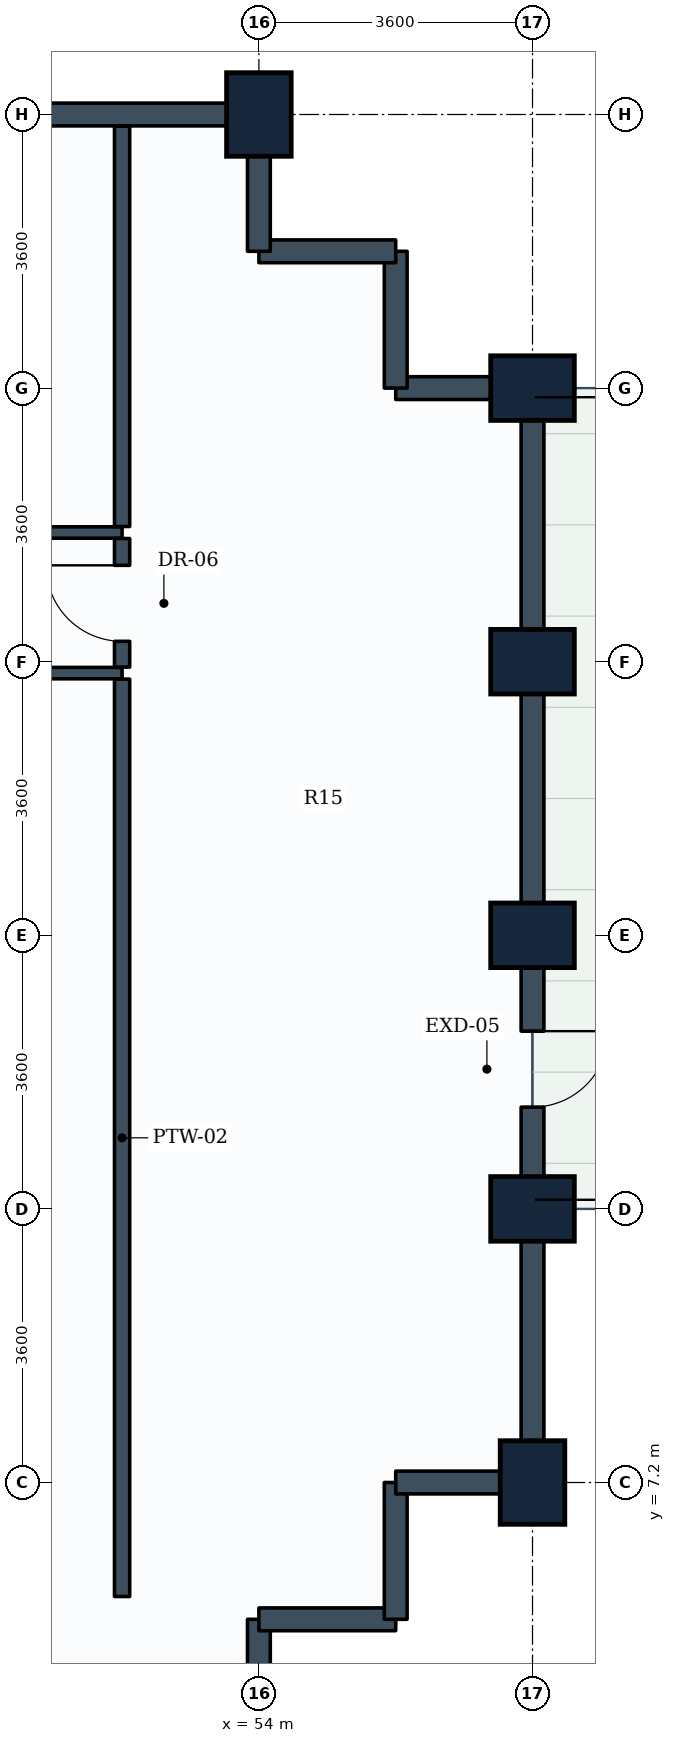
"""IFC4 building model, lengths in metres.
Left out: names, types, materials, properties, quantities, classifications, styles, units other than length and angle.
Written with IfcOpenShell. Run it as: python <this file> out.ifc"""

import sys

from ifc_helpers import new_model, si_unit, direction, frame, frame_2d, origin, origin_2d, place, context, subcontext, project, spatial, rectangle, extrude, element, fill, save


model = new_model("IFC4")
c1 = context("Model", 3, precision=1e-05, world=origin(), true_north=direction((0.0, 1.0)))
c2 = subcontext(c1, "Body", "Model", "MODEL_VIEW")
j1 = project(units=[si_unit("LENGTHUNIT", "METRE"), si_unit("PLANEANGLEUNIT", "RADIAN")], contexts=[c1])
p1 = place(None, origin())
s1 = spatial("IfcSite", under=j1, at=p1, CompositionType="ELEMENT")
p2 = place(p1, origin())
s2 = spatial("IfcBuilding", under=s1, at=p2, CompositionType="ELEMENT")
p3 = place(p2, frame((0.0, 0.0, 99.6)))
s3 = spatial("IfcBuildingStorey", under=s2, at=p3, CompositionType="ELEMENT", Elevation=99.6)
for number, where, z_axis, x_axis in (
    (1, (54.0, 25.2, 0.0), (0.0, 0.0, 1.0), (1.0, 0.0, 0.0)),
    (2, (57.6, 7.2, 0.0), (0.0, 0.0, 1.0), (1.0, 0.0, 0.0)),
    (3, (57.6, 10.8, 0.0), (0.0, 0.0, 1.0), (0.0, 1.0, 0.0)),
    (4, (57.6, 14.4, 0.0), (0.0, 0.0, 1.0), (0.0, 1.0, 0.0)),
    (5, (57.6, 18.0, 0.0), (0.0, 0.0, 1.0), (0.0, 1.0, 0.0)),
    (6, (57.6, 21.6, 0.0), (0.0, 0.0, 1.0), (0.0, 1.0, 0.0)),
):
    element("IfcColumn", number, at=place(p3, frame(where, z_axis=z_axis, x_axis=x_axis)), inside=s3, PredefinedType="COLUMN", context=c2, shape_type="SweptSolid", body=[
        extrude(rectangle(XDim=0.85, YDim=1.1, at=origin_2d()), origin(), (0.0, 0.0, 1.0), 3.9),
    ])
p4 = place(p3, frame((54.0, 5.4, 0.0), z_axis=(0.0, 0.0, 1.0), x_axis=(0.0, -1.0, 0.0)))
e7 = element("IfcWall", 7, at=p4, inside=s3, PredefinedType="STANDARD", context=c2, shape_type="SweptSolid", body=[
    extrude(rectangle(XDim=1.8, YDim=0.3, at=frame_2d((0.9, 0.0))), origin(), (0.0, 0.0, 1.0), 2.93),
])
for number, where, z_axis, x_axis in (
    (8, (55.8, 5.4, 0.0), (0.0, 0.0, 1.0), (-1.0, 0.0, 0.0)),
    (9, (55.8, 7.2, 0.0), (0.0, 0.0, 1.0), (0.0, -1.0, 0.0)),
):
    element("IfcWall", number, at=place(p3, frame(where, z_axis=z_axis, x_axis=x_axis)), inside=s3, PredefinedType="STANDARD", context=c2, shape_type="SweptSolid", body=[
        extrude(rectangle(XDim=1.8, YDim=0.3, at=frame_2d((0.9, 0.0))), origin(), (0.0, 0.0, 1.0), 3.635),
    ])
p5 = place(p3, frame((57.6, 7.2, 0.0), z_axis=(0.0, 0.0, 1.0), x_axis=(-1.0, 0.0, 0.0)))
e10 = element("IfcWall", 10, at=p5, inside=s3, PredefinedType="STANDARD", context=c2, shape_type="SweptSolid", body=[
    extrude(rectangle(XDim=1.8, YDim=0.3, at=frame_2d((0.9, 0.0))), origin(), (0.0, 0.0, 1.0), 2.93),
])
p6 = place(p3, frame((57.6, 10.8, 0.0), z_axis=(0.0, 0.0, 1.0), x_axis=(0.0, -1.0, 0.0)))
e11 = element("IfcWall", 11, at=p6, inside=s3, PredefinedType="STANDARD", context=c2, shape_type="SweptSolid", body=[
    extrude(rectangle(XDim=3.6, YDim=0.3, at=frame_2d((1.8, 0.0))), origin(), (0.0, 0.0, 1.0), 2.93),
])
p7 = place(p3, frame((57.6, 14.4, 0.0), z_axis=(0.0, 0.0, 1.0), x_axis=(0.0, -1.0, 0.0)))
e12 = element("IfcWall", 12, at=p7, inside=s3, PredefinedType="STANDARD", context=c2, shape_type="SweptSolid", body=[
    extrude(rectangle(XDim=3.6, YDim=0.3, at=frame_2d((1.8, 0.0))), origin(), (0.0, 0.0, 1.0), 2.93),
])
p8 = place(p7, frame((1.261, 0.0, 0.0)))
e13 = element("IfcOpeningElement", 13, at=p8, cuts=e12, PredefinedType="OPENING", context=c2, shape_type="SweptSolid", body=[
    extrude(rectangle(XDim=1.0, YDim=2.1, at=frame_2d((0.5, 1.05))), frame((0.0, 0.16, 0.0), z_axis=(0.0, -1.0, 0.0), x_axis=(1.0, 0.0, 0.0)), (0.0, 0.0, 1.0), 0.32),
])
for number, where, z_axis, x_axis in (
    (14, (57.6, 18.0, 0.0), (0.0, 0.0, 1.0), (0.0, -1.0, 0.0)),
    (15, (57.6, 21.6, 0.0), (0.0, 0.0, 1.0), (0.0, -1.0, 0.0)),
):
    element("IfcWall", number, at=place(p3, frame(where, z_axis=z_axis, x_axis=x_axis)), inside=s3, PredefinedType="STANDARD", context=c2, shape_type="SweptSolid", body=[
        extrude(rectangle(XDim=3.6, YDim=0.3, at=frame_2d((1.8, 0.0))), origin(), (0.0, 0.0, 1.0), 2.93),
    ])
p9 = place(p3, frame((55.8, 21.6, 0.0), z_axis=(0.0, 0.0, 1.0), x_axis=(1.0, 0.0, 0.0)))
e16 = element("IfcWall", 16, at=p9, inside=s3, PredefinedType="STANDARD", context=c2, shape_type="SweptSolid", body=[
    extrude(rectangle(XDim=1.8, YDim=0.3, at=frame_2d((0.9, 0.0))), origin(), (0.0, 0.0, 1.0), 2.93),
])
p10 = place(p3, frame((55.8, 23.4, 0.0), z_axis=(0.0, 0.0, 1.0), x_axis=(0.0, -1.0, 0.0)))
e17 = element("IfcWall", 17, at=p10, inside=s3, PredefinedType="STANDARD", context=c2, shape_type="SweptSolid", body=[
    extrude(rectangle(XDim=1.8, YDim=0.3, at=frame_2d((0.9, 0.0))), origin(), (0.0, 0.0, 1.0), 3.635),
])
p11 = place(p3, frame((54.0, 23.4, 0.0), z_axis=(0.0, 0.0, 1.0), x_axis=(1.0, 0.0, 0.0)))
e18 = element("IfcWall", 18, at=p11, inside=s3, PredefinedType="STANDARD", context=c2, shape_type="SweptSolid", body=[
    extrude(rectangle(XDim=1.8, YDim=0.3, at=frame_2d((0.9, 0.0))), origin(), (0.0, 0.0, 1.0), 3.635),
])
p12 = place(p3, frame((54.0, 25.2, 0.0), z_axis=(0.0, 0.0, 1.0), x_axis=(0.0, -1.0, 0.0)))
e19 = element("IfcWall", 19, at=p12, inside=s3, PredefinedType="STANDARD", context=c2, shape_type="SweptSolid", body=[
    extrude(rectangle(XDim=1.8, YDim=0.3, at=frame_2d((0.9, 0.0))), origin(), (0.0, 0.0, 1.0), 2.93),
])
p13 = place(p3, frame((50.4, 25.2, 0.0), z_axis=(0.0, 0.0, 1.0), x_axis=(1.0, 0.0, 0.0)))
e20 = element("IfcWall", 20, at=p13, inside=s3, PredefinedType="STANDARD", context=c2, shape_type="SweptSolid", body=[
    extrude(rectangle(XDim=3.6, YDim=0.3, at=frame_2d((1.8, 0.0))), origin(), (0.0, 0.0, 1.0), 2.93),
])
p14 = place(p3, frame((41.429, 17.85, 0.0), z_axis=(0.0, 0.0, 1.0), x_axis=(1.0, 0.0, 0.0)))
e21 = element("IfcWall", 21, at=p14, inside=s3, PredefinedType="PARTITIONING", context=c2, shape_type="SweptSolid", body=[
    extrude(rectangle(XDim=10.771, YDim=0.15, at=frame_2d((5.385, 0.0))), origin(), (0.0, 0.0, 1.0), 3.18),
])
p15 = place(p14, frame((4.806, 0.0, 0.0)))
e22 = element("IfcOpeningElement", 22, at=p15, cuts=e21, PredefinedType="OPENING", context=c2, shape_type="SweptSolid", body=[
    extrude(rectangle(XDim=1.0, YDim=2.1, at=frame_2d((0.5, 1.05))), frame((0.0, 0.085, 0.0), z_axis=(0.0, -1.0, 0.0), x_axis=(1.0, 0.0, 0.0)), (0.0, 0.0, 1.0), 0.17),
])
p16 = place(p3, frame((45.679, 19.7, 0.0), z_axis=(0.0, 0.0, 1.0), x_axis=(1.0, 0.0, 0.0)))
e23 = element("IfcWall", 23, at=p16, inside=s3, PredefinedType="PARTITIONING", context=c2, shape_type="SweptSolid", body=[
    extrude(rectangle(XDim=6.521, YDim=0.15, at=frame_2d((3.26, 0.0))), origin(), (0.0, 0.0, 1.0), 3.19),
])
p17 = place(p16, frame((2.721, 0.0, 0.0)))
e24 = element("IfcOpeningElement", 24, at=p17, cuts=e23, PredefinedType="OPENING", context=c2, shape_type="SweptSolid", body=[
    extrude(rectangle(XDim=1.0, YDim=2.1, at=frame_2d((0.5, 1.05))), frame((0.0, 0.085, 0.0), z_axis=(0.0, -1.0, 0.0), x_axis=(1.0, 0.0, 0.0)), (0.0, 0.0, 1.0), 0.17),
])
p18 = place(p3, frame((52.2, 5.7, 0.0), z_axis=(0.0, 0.0, 1.0), x_axis=(0.0, 1.0, 0.0)))
e25 = element("IfcWall", 25, at=p18, inside=s3, PredefinedType="PARTITIONING", context=c2, shape_type="SweptSolid", body=[
    extrude(rectangle(XDim=12.071, YDim=0.2, at=frame_2d((6.036, 0.0))), origin(), (0.0, 0.0, 1.0), 3.18),
])
p19 = place(p3, frame((52.2, 19.779, 0.0), z_axis=(0.0, 0.0, 1.0), x_axis=(0.0, 1.0, 0.0)))
e26 = element("IfcWall", 26, at=p19, inside=s3, PredefinedType="PARTITIONING", context=c2, shape_type="SweptSolid", body=[
    extrude(rectangle(XDim=5.267, YDim=0.2, at=frame_2d((2.633, 0.0))), origin(), (0.0, 0.0, 1.0), 2.93),
])
p20 = place(p3, frame((52.2, 17.929, 0.0), z_axis=(0.0, 0.0, 1.0), x_axis=(0.0, 1.0, 0.0)))
e27 = element("IfcWall", 27, at=p20, inside=s3, PredefinedType="PARTITIONING", context=c2, shape_type="SweptSolid", body=[
    extrude(rectangle(XDim=1.692, YDim=0.2, at=frame_2d((0.846, 0.0))), origin(), (0.0, 0.0, 1.0), 3.635),
])
p21 = place(p20, frame((0.339, 0.0, 0.0)))
e28 = element("IfcOpeningElement", 28, at=p21, cuts=e27, PredefinedType="OPENING", context=c2, shape_type="SweptSolid", body=[
    extrude(rectangle(XDim=1.0, YDim=2.1, at=frame_2d((0.5, 1.05))), frame((0.0, 0.11, 0.0), z_axis=(0.0, -1.0, 0.0), x_axis=(1.0, 0.0, 0.0)), (0.0, 0.0, 1.0), 0.22),
])
p22 = place(p8, origin())
e29 = element("IfcDoor", 29, at=p22, inside=s3, OperationType="SINGLE_SWING_LEFT", PredefinedType="DOOR", context=c2, shape_type="SweptSolid", body=[
    extrude(rectangle(XDim=1.0, YDim=2.1, at=frame_2d((0.5, 1.05))), frame((0.0, 0.025, 0.0), z_axis=(0.0, -1.0, 0.0), x_axis=(1.0, 0.0, 0.0)), (0.0, 0.0, 1.0), 0.05),
])
fill(e13, e29)
p23 = place(p21, origin())
e30 = element("IfcDoor", 30, at=p23, inside=s3, OperationType="SINGLE_SWING_RIGHT", PredefinedType="DOOR", context=c2, shape_type="SweptSolid", body=[
    extrude(rectangle(XDim=1.0, YDim=2.1, at=frame_2d((0.5, 1.05))), frame((0.0, 0.025, 0.0), z_axis=(0.0, -1.0, 0.0), x_axis=(1.0, 0.0, 0.0)), (0.0, 0.0, 1.0), 0.05),
])
fill(e28, e30)
save(model, sys.argv[1])
